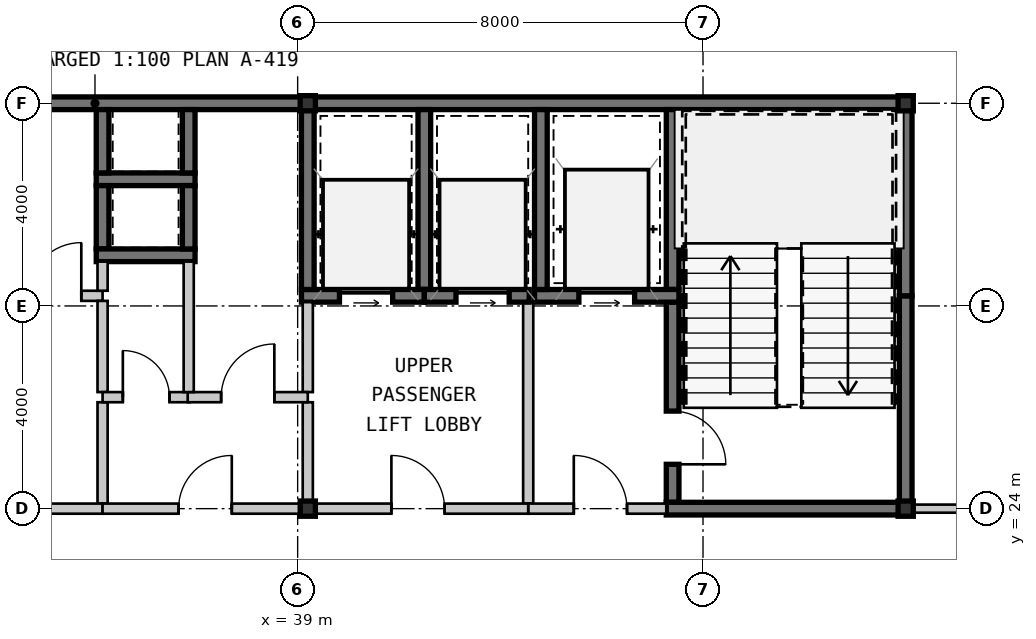
"""IFC4 building model, lengths in metres.
Left out: names, types, materials, properties, quantities, classifications, styles, units other than length and angle.
Written with IfcOpenShell. Run it as: python <this file> out.ifc"""

import sys

from ifc_helpers import new_model, si_unit, direction, frame, frame_2d, origin, origin_2d, place, context, subcontext, project, spatial, rectangle, hollow_rectangle, extrude, source, transform, mapped, element, fill, save


model = new_model("IFC4")
c1 = context("Model", 3, precision=1e-05, world=origin(), true_north=direction((0.0, 1.0)))
c2 = subcontext(c1, "Body", "Model", "MODEL_VIEW")
j1 = project(units=[si_unit("LENGTHUNIT", "METRE"), si_unit("PLANEANGLEUNIT", "RADIAN")], contexts=[c1])
p1 = place(None, origin())
s1 = spatial("IfcSite", under=j1, at=p1, CompositionType="ELEMENT")
p2 = place(p1, origin())
s2 = spatial("IfcBuilding", under=s1, at=p2, CompositionType="ELEMENT")
p3 = place(p2, frame((0.0, 0.0, 246.05)))
s3 = spatial("IfcBuildingStorey", under=s2, at=p3, CompositionType="ELEMENT", Elevation=246.05)
m1 = source(origin(), c2, "Body", "SweptSolid", [
    extrude(hollow_rectangle(XDim=0.3, YDim=0.3, WallThickness=0.012, at=origin_2d()), origin(), (0.0, 0.0, 1.0), 3.15),
])
for number, where, z_axis, x_axis in (
    (1, (39.2, 24.0, 0.0), (0.0, 0.0, 1.0), (1.0, 0.0, 0.0)),
    (2, (51.0, 24.0, 0.0), (0.0, 0.0, 1.0), (1.0, 0.0, 0.0)),
    (3, (39.2, 32.0, 0.0), (0.0, 0.0, 1.0), (1.0, 0.0, 0.0)),
    (4, (51.0, 32.0, 0.0), (0.0, 0.0, 1.0), (1.0, 0.0, 0.0)),
):
    element("IfcColumn", number, at=place(p3, frame(where, z_axis=z_axis, x_axis=x_axis)), inside=s3, PredefinedType="COLUMN", context=c2, shape_type="MappedRepresentation", body=[
        mapped(m1, transform((0.0, 0.0, 0.0), scale=1.0)),
    ])
m2 = source(origin(), c2, "Body", "SweptSolid", [
    extrude(rectangle(XDim=11.2, YDim=0.25, at=frame_2d((5.6, 0.0))), origin(), (0.0, 0.0, 1.0), 2.93),
])
p4 = place(p3, frame((28.0, 32.0, 0.0), z_axis=(0.0, 0.0, 1.0), x_axis=(1.0, 0.0, 0.0)))
e5 = element("IfcWall", 5, at=p4, inside=s3, PredefinedType="SHEAR", context=c2, shape_type="MappedRepresentation", body=[
    mapped(m2, transform((0.0, 0.0, 0.0), scale=1.0)),
])
m3 = source(origin(), c2, "Body", "SweptSolid", [
    extrude(rectangle(XDim=11.925, YDim=0.25, at=frame_2d((5.962, 0.0))), origin(), (0.0, 0.0, 1.0), 2.93),
])
p5 = place(p3, frame((39.2, 32.0, 0.0), z_axis=(0.0, 0.0, 1.0), x_axis=(1.0, 0.0, 0.0)))
e6 = element("IfcWall", 6, at=p5, inside=s3, PredefinedType="SHEAR", context=c2, shape_type="MappedRepresentation", body=[
    mapped(m3, transform((0.0, 0.0, 0.0), scale=1.0)),
])
m4 = source(origin(), c2, "Body", "SweptSolid", [
    extrude(rectangle(XDim=4.075, YDim=0.25, at=frame_2d((2.038, 0.0))), origin(), (0.0, 0.0, 1.0), 2.93),
])
p6 = place(p3, frame((51.0, 24.125, 0.0), z_axis=(0.0, 0.0, 1.0), x_axis=(0.0, 1.0, 0.0)))
e7 = element("IfcWall", 7, at=p6, inside=s3, PredefinedType="SHEAR", context=c2, shape_type="MappedRepresentation", body=[
    mapped(m4, transform((0.0, 0.0, 0.0), scale=1.0)),
])
m5 = source(origin(), c2, "Body", "SweptSolid", [
    extrude(rectangle(XDim=3.675, YDim=0.25, at=frame_2d((1.837, 0.0))), origin(), (0.0, 0.0, 1.0), 2.93),
])
p7 = place(p3, frame((51.0, 28.2, 0.0), z_axis=(0.0, 0.0, 1.0), x_axis=(0.0, 1.0, 0.0)))
e8 = element("IfcWall", 8, at=p7, inside=s3, PredefinedType="SHEAR", context=c2, shape_type="MappedRepresentation", body=[
    mapped(m5, transform((0.0, 0.0, 0.0), scale=1.0)),
])
m6 = source(origin(), c2, "Body", "SweptSolid", [
    extrude(rectangle(XDim=3.55, YDim=0.25, at=frame_2d((1.775, 0.0))), origin(), (0.0, 0.0, 1.0), 2.93),
])
p8 = place(p3, frame((46.4, 31.875, 0.0), z_axis=(0.0, 0.0, 1.0), x_axis=(0.0, -1.0, 0.0)))
e9 = element("IfcWall", 9, at=p8, inside=s3, PredefinedType="SHEAR", context=c2, shape_type="MappedRepresentation", body=[
    mapped(m6, transform((0.0, 0.0, 0.0), scale=1.0)),
])
m7 = source(origin(), c2, "Body", "SweptSolid", [
    extrude(rectangle(XDim=3.95, YDim=0.25, at=frame_2d((1.975, 0.0))), origin(), (0.0, 0.0, 1.0), 2.93),
])
p9 = place(p3, frame((46.4, 28.075, 0.0), z_axis=(0.0, 0.0, 1.0), x_axis=(0.0, -1.0, 0.0)))
e10 = element("IfcWall", 10, at=p9, inside=s3, PredefinedType="SHEAR", context=c2, shape_type="MappedRepresentation", body=[
    mapped(m7, transform((0.0, 0.0, 0.0), scale=1.0)),
])
m8 = source(origin(), c2, "Body", "SweptSolid", [
    extrude(rectangle(XDim=1.05, YDim=2.1, at=frame_2d((0.525, 1.05))), frame((0.0, 0.135, 0.0), z_axis=(0.0, -1.0, 0.0), x_axis=(1.0, 0.0, 0.0)), (0.0, 0.0, 1.0), 0.27),
])
p10 = place(p9, frame((2.15, 0.0, 0.0)))
e11 = element("IfcOpeningElement", 11, at=p10, cuts=e10, PredefinedType="OPENING", context=c2, shape_type="MappedRepresentation", body=[
    mapped(m8, transform((0.0, 0.0, 0.0), scale=1.0)),
])
m9 = source(origin(), c2, "Body", "SweptSolid", [
    extrude(rectangle(XDim=4.85, YDim=0.25, at=frame_2d((2.425, 0.0))), origin(), (0.0, 0.0, 1.0), 2.93),
])
p11 = place(p3, frame((46.275, 24.0, 0.0), z_axis=(0.0, 0.0, 1.0), x_axis=(1.0, 0.0, 0.0)))
e12 = element("IfcWall", 12, at=p11, inside=s3, PredefinedType="SHEAR", context=c2, shape_type="MappedRepresentation", body=[
    mapped(m9, transform((0.0, 0.0, 0.0), scale=1.0)),
])
m10 = source(origin(), c2, "Body", "SweptSolid", [
    extrude(rectangle(XDim=2.85, YDim=0.25, at=frame_2d((1.425, 0.0))), origin(), (0.0, 0.0, 1.0), 2.93),
])
p12 = place(p3, frame((43.675, 28.2, 0.0), z_axis=(0.0, 0.0, 1.0), x_axis=(1.0, 0.0, 0.0)))
e13 = element("IfcWall", 13, at=p12, inside=s3, PredefinedType="SHEAR", context=c2, shape_type="MappedRepresentation", body=[
    mapped(m10, transform((0.0, 0.0, 0.0), scale=1.0)),
])
m11 = source(origin(), c2, "Body", "SweptSolid", [
    extrude(rectangle(XDim=1.1, YDim=2.15, at=frame_2d((0.55, 1.075))), frame((0.0, 0.135, 0.0), z_axis=(0.0, -1.0, 0.0), x_axis=(1.0, 0.0, 0.0)), (0.0, 0.0, 1.0), 0.27),
])
p13 = place(p12, frame((0.875, 0.0, 0.0)))
e14 = element("IfcOpeningElement", 14, at=p13, cuts=e13, PredefinedType="OPENING", context=c2, shape_type="MappedRepresentation", body=[
    mapped(m11, transform((0.0, 0.0, 0.0), scale=1.0)),
])
p14 = place(p3, frame((43.8, 31.875, 0.0), z_axis=(0.0, 0.0, 1.0), x_axis=(0.0, -1.0, 0.0)))
e15 = element("IfcWall", 15, at=p14, inside=s3, PredefinedType="SHEAR", context=c2, shape_type="MappedRepresentation", body=[
    mapped(m6, transform((0.0, 0.0, 0.0), scale=1.0)),
])
m12 = source(origin(), c2, "Body", "SweptSolid", [
    extrude(rectangle(XDim=3.975, YDim=0.2, at=frame_2d((1.987, 0.0))), origin(), (0.0, 0.0, 1.0), 2.93),
])
p15 = place(p3, frame((43.55, 28.075, 0.0), z_axis=(0.0, 0.0, 1.0), x_axis=(0.0, -1.0, 0.0)))
e16 = element("IfcWall", 16, at=p15, inside=s3, PredefinedType="SOLIDWALL", context=c2, shape_type="MappedRepresentation", body=[
    mapped(m12, transform((0.0, 0.0, 0.0), scale=1.0)),
])
m13 = source(origin(), c2, "Body", "SweptSolid", [
    extrude(rectangle(XDim=2.725, YDim=0.2, at=frame_2d((1.362, 0.0))), origin(), (0.0, 0.0, 1.0), 2.397),
])
p16 = place(p3, frame((43.55, 24.0, 0.0), z_axis=(0.0, 0.0, 1.0), x_axis=(1.0, 0.0, 0.0)))
e17 = element("IfcWall", 17, at=p16, inside=s3, PredefinedType="SOLIDWALL", context=c2, shape_type="MappedRepresentation", body=[
    mapped(m13, transform((0.0, 0.0, 0.0), scale=1.0)),
])
m14 = source(origin(), c2, "Body", "SweptSolid", [
    extrude(rectangle(XDim=1.05, YDim=2.1, at=frame_2d((0.525, 1.05))), frame((0.0, 0.11, 0.0), z_axis=(0.0, -1.0, 0.0), x_axis=(1.0, 0.0, 0.0)), (0.0, 0.0, 1.0), 0.22),
])
p17 = place(p16, frame((0.9, 0.0, 0.0)))
e18 = element("IfcOpeningElement", 18, at=p17, cuts=e17, PredefinedType="OPENING", context=c2, shape_type="MappedRepresentation", body=[
    mapped(m14, transform((0.0, 0.0, 0.0), scale=1.0)),
])
m15 = source(origin(), c2, "Body", "SweptSolid", [
    extrude(rectangle(XDim=1.95, YDim=0.25, at=frame_2d((0.975, 0.0))), origin(), (0.0, 0.0, 1.0), 2.93),
])
p18 = place(p3, frame((35.025, 30.5, 0.0), z_axis=(0.0, 0.0, 1.0), x_axis=(1.0, 0.0, 0.0)))
e19 = element("IfcWall", 19, at=p18, inside=s3, PredefinedType="SHEAR", context=c2, shape_type="MappedRepresentation", body=[
    mapped(m15, transform((0.0, 0.0, 0.0), scale=1.0)),
])
m16 = source(origin(), c2, "Body", "SweptSolid", [
    extrude(rectangle(XDim=1.25, YDim=0.25, at=frame_2d((0.625, 0.0))), origin(), (0.0, 0.0, 1.0), 2.93),
])
for number, where, z_axis, x_axis in (
    (20, (35.15, 31.875, 0.0), (0.0, 0.0, 1.0), (0.0, -1.0, 0.0)),
    (21, (36.85, 30.625, 0.0), (0.0, 0.0, 1.0), (0.0, 1.0, 0.0)),
    (22, (35.15, 30.375, 0.0), (0.0, 0.0, 1.0), (0.0, -1.0, 0.0)),
):
    element("IfcWall", number, at=place(p3, frame(where, z_axis=z_axis, x_axis=x_axis)), inside=s3, PredefinedType="SHEAR", context=c2, shape_type="MappedRepresentation", body=[
        mapped(m16, transform((0.0, 0.0, 0.0), scale=1.0)),
    ])
p19 = place(p3, frame((35.025, 29.0, 0.0), z_axis=(0.0, 0.0, 1.0), x_axis=(1.0, 0.0, 0.0)))
e23 = element("IfcWall", 23, at=p19, inside=s3, PredefinedType="SHEAR", context=c2, shape_type="MappedRepresentation", body=[
    mapped(m15, transform((0.0, 0.0, 0.0), scale=1.0)),
])
p20 = place(p3, frame((36.85, 29.125, 0.0), z_axis=(0.0, 0.0, 1.0), x_axis=(0.0, 1.0, 0.0)))
e24 = element("IfcWall", 24, at=p20, inside=s3, PredefinedType="SHEAR", context=c2, shape_type="MappedRepresentation", body=[
    mapped(m16, transform((0.0, 0.0, 0.0), scale=1.0)),
])
p21 = place(p3, frame((41.5, 28.325, 0.0), z_axis=(0.0, 0.0, 1.0), x_axis=(0.0, 1.0, 0.0)))
e25 = element("IfcWall", 25, at=p21, inside=s3, PredefinedType="SHEAR", context=c2, shape_type="MappedRepresentation", body=[
    mapped(m6, transform((0.0, 0.0, 0.0), scale=1.0)),
])
m17 = source(origin(), c2, "Body", "SweptSolid", [
    extrude(rectangle(XDim=2.425, YDim=0.25, at=frame_2d((1.212, 0.0))), origin(), (0.0, 0.0, 1.0), 2.93),
])
p22 = place(p3, frame((39.075, 28.2, 0.0), z_axis=(0.0, 0.0, 1.0), x_axis=(1.0, 0.0, 0.0)))
e26 = element("IfcWall", 26, at=p22, inside=s3, PredefinedType="SHEAR", context=c2, shape_type="MappedRepresentation", body=[
    mapped(m17, transform((0.0, 0.0, 0.0), scale=1.0)),
])
m18 = source(origin(), c2, "Body", "SweptSolid", [
    extrude(rectangle(XDim=1.05, YDim=2.15, at=frame_2d((0.525, 1.075))), frame((0.0, 0.135, 0.0), z_axis=(0.0, -1.0, 0.0), x_axis=(1.0, 0.0, 0.0)), (0.0, 0.0, 1.0), 0.27),
])
p23 = place(p22, frame((0.75, 0.0, 0.0)))
e27 = element("IfcOpeningElement", 27, at=p23, cuts=e26, PredefinedType="OPENING", context=c2, shape_type="MappedRepresentation", body=[
    mapped(m18, transform((0.0, 0.0, 0.0), scale=1.0)),
])
p24 = place(p3, frame((39.2, 31.875, 0.0), z_axis=(0.0, 0.0, 1.0), x_axis=(0.0, -1.0, 0.0)))
e28 = element("IfcWall", 28, at=p24, inside=s3, PredefinedType="SHEAR", context=c2, shape_type="MappedRepresentation", body=[
    mapped(m6, transform((0.0, 0.0, 0.0), scale=1.0)),
])
m19 = source(origin(), c2, "Body", "SweptSolid", [
    extrude(rectangle(XDim=2.07, YDim=0.25, at=frame_2d((1.035, 0.0))), origin(), (0.0, 0.0, 1.0), 2.93),
])
p25 = place(p3, frame((41.5, 28.2, 0.0), z_axis=(0.0, 0.0, 1.0), x_axis=(1.0, 0.0, 0.0)))
e29 = element("IfcWall", 29, at=p25, inside=s3, PredefinedType="SHEAR", context=c2, shape_type="MappedRepresentation", body=[
    mapped(m19, transform((0.0, 0.0, 0.0), scale=1.0)),
])
p26 = place(p25, frame((0.625, 0.0, 0.0)))
e30 = element("IfcOpeningElement", 30, at=p26, cuts=e29, PredefinedType="OPENING", context=c2, shape_type="MappedRepresentation", body=[
    mapped(m18, transform((0.0, 0.0, 0.0), scale=1.0)),
])
m20 = source(origin(), c2, "Body", "SweptSolid", [
    extrude(rectangle(XDim=2.0, YDim=0.2, at=frame_2d((1.0, 0.0))), origin(), (0.0, 0.0, 1.0), 2.47),
])
p27 = place(p3, frame((39.2, 24.1, 0.0), z_axis=(0.0, 0.0, 1.0), x_axis=(0.0, 1.0, 0.0)))
e31 = element("IfcWall", 31, at=p27, inside=s3, PredefinedType="SOLIDWALL", context=c2, shape_type="MappedRepresentation", body=[
    mapped(m20, transform((0.0, 0.0, 0.0), scale=1.0)),
])
m21 = source(origin(), c2, "Body", "SweptSolid", [
    extrude(rectangle(XDim=1.775, YDim=0.2, at=frame_2d((0.887, 0.0))), origin(), (0.0, 0.0, 1.0), 2.47),
])
p28 = place(p3, frame((39.2, 26.3, 0.0), z_axis=(0.0, 0.0, 1.0), x_axis=(0.0, 1.0, 0.0)))
e32 = element("IfcWall", 32, at=p28, inside=s3, PredefinedType="SOLIDWALL", context=c2, shape_type="MappedRepresentation", body=[
    mapped(m21, transform((0.0, 0.0, 0.0), scale=1.0)),
])
m22 = source(origin(), c2, "Body", "SweptSolid", [
    extrude(rectangle(XDim=4.35, YDim=0.2, at=frame_2d((2.175, 0.0))), origin(), (0.0, 0.0, 1.0), 2.397),
])
p29 = place(p3, frame((43.55, 24.0, 0.0), z_axis=(0.0, 0.0, 1.0), x_axis=(-1.0, 0.0, 0.0)))
e33 = element("IfcWall", 33, at=p29, inside=s3, PredefinedType="SOLIDWALL", context=c2, shape_type="MappedRepresentation", body=[
    mapped(m22, transform((0.0, 0.0, 0.0), scale=1.0)),
])
p30 = place(p29, frame((1.65, 0.0, 0.0)))
e34 = element("IfcOpeningElement", 34, at=p30, cuts=e33, PredefinedType="OPENING", context=c2, shape_type="MappedRepresentation", body=[
    mapped(m14, transform((0.0, 0.0, 0.0), scale=1.0)),
])
m23 = source(origin(), c2, "Body", "SweptSolid", [
    extrude(rectangle(XDim=4.35, YDim=0.2, at=frame_2d((2.175, 0.0))), origin(), (0.0, 0.0, 1.0), 2.93),
])
p31 = place(p3, frame((30.8, 28.2, 0.0), z_axis=(0.0, 0.0, 1.0), x_axis=(1.0, 0.0, 0.0)))
e35 = element("IfcWall", 35, at=p31, inside=s3, PredefinedType="SOLIDWALL", context=c2, shape_type="MappedRepresentation", body=[
    mapped(m23, transform((0.0, 0.0, 0.0), scale=1.0)),
])
p32 = place(p31, frame((2.88, 0.0, 0.0)))
e36 = element("IfcOpeningElement", 36, at=p32, cuts=e35, PredefinedType="OPENING", context=c2, shape_type="MappedRepresentation", body=[
    mapped(m14, transform((0.0, 0.0, 0.0), scale=1.0)),
])
m24 = source(origin(), c2, "Body", "SweptSolid", [
    extrude(rectangle(XDim=2.0, YDim=0.2, at=frame_2d((1.0, 0.0))), origin(), (0.0, 0.0, 1.0), 2.93),
])
p33 = place(p3, frame((35.15, 26.1, 0.0), z_axis=(0.0, 0.0, 1.0), x_axis=(0.0, -1.0, 0.0)))
e37 = element("IfcWall", 37, at=p33, inside=s3, PredefinedType="SOLIDWALL", context=c2, shape_type="MappedRepresentation", body=[
    mapped(m24, transform((0.0, 0.0, 0.0), scale=1.0)),
])
m25 = source(origin(), c2, "Body", "SweptSolid", [
    extrude(rectangle(XDim=1.8, YDim=0.2, at=frame_2d((0.9, 0.0))), origin(), (0.0, 0.0, 1.0), 2.93),
])
p34 = place(p3, frame((35.15, 28.1, 0.0), z_axis=(0.0, 0.0, 1.0), x_axis=(0.0, -1.0, 0.0)))
e38 = element("IfcWall", 38, at=p34, inside=s3, PredefinedType="SOLIDWALL", context=c2, shape_type="MappedRepresentation", body=[
    mapped(m25, transform((0.0, 0.0, 0.0), scale=1.0)),
])
m26 = source(origin(), c2, "Body", "SweptSolid", [
    extrude(rectangle(XDim=4.35, YDim=0.2, at=frame_2d((2.175, 0.0))), origin(), (0.0, 0.0, 1.0), 2.47),
])
p35 = place(p3, frame((35.15, 24.0, 0.0), z_axis=(0.0, 0.0, 1.0), x_axis=(-1.0, 0.0, 0.0)))
e39 = element("IfcWall", 39, at=p35, inside=s3, PredefinedType="SOLIDWALL", context=c2, shape_type="MappedRepresentation", body=[
    mapped(m26, transform((0.0, 0.0, 0.0), scale=1.0)),
])
p36 = place(p35, frame((1.65, 0.0, 0.0)))
e40 = element("IfcOpeningElement", 40, at=p36, cuts=e39, PredefinedType="OPENING", context=c2, shape_type="MappedRepresentation", body=[
    mapped(m14, transform((0.0, 0.0, 0.0), scale=1.0)),
])
m27 = source(origin(), c2, "Body", "SweptSolid", [
    extrude(rectangle(XDim=0.575, YDim=0.2, at=frame_2d((0.288, 0.0))), origin(), (0.0, 0.0, 1.0), 2.93),
])
p37 = place(p3, frame((35.15, 28.875, 0.0), z_axis=(0.0, 0.0, 1.0), x_axis=(0.0, -1.0, 0.0)))
e41 = element("IfcWall", 41, at=p37, inside=s3, PredefinedType="SOLIDWALL", context=c2, shape_type="MappedRepresentation", body=[
    mapped(m27, transform((0.0, 0.0, 0.0), scale=1.0)),
])
m28 = source(origin(), c2, "Body", "SweptSolid", [
    extrude(rectangle(XDim=1.72, YDim=0.2, at=frame_2d((0.86, 0.0))), origin(), (0.0, 0.0, 1.0), 2.93),
])
p38 = place(p3, frame((35.15, 26.2, 0.0), z_axis=(0.0, 0.0, 1.0), x_axis=(1.0, 0.0, 0.0)))
e42 = element("IfcWall", 42, at=p38, inside=s3, PredefinedType="SOLIDWALL", context=c2, shape_type="MappedRepresentation", body=[
    mapped(m28, transform((0.0, 0.0, 0.0), scale=1.0)),
])
m29 = source(origin(), c2, "Body", "SweptSolid", [
    extrude(rectangle(XDim=0.92, YDim=2.1, at=frame_2d((0.46, 1.05))), frame((0.0, 0.11, 0.0), z_axis=(0.0, -1.0, 0.0), x_axis=(1.0, 0.0, 0.0)), (0.0, 0.0, 1.0), 0.22),
])
p39 = place(p38, frame((0.4, 0.0, 0.0)))
e43 = element("IfcOpeningElement", 43, at=p39, cuts=e42, PredefinedType="OPENING", context=c2, shape_type="MappedRepresentation", body=[
    mapped(m29, transform((0.0, 0.0, 0.0), scale=1.0)),
])
m30 = source(origin(), c2, "Body", "SweptSolid", [
    extrude(rectangle(XDim=2.37, YDim=0.2, at=frame_2d((1.185, 0.0))), origin(), (0.0, 0.0, 1.0), 2.93),
])
p40 = place(p3, frame((36.83, 26.2, 0.0), z_axis=(0.0, 0.0, 1.0), x_axis=(1.0, 0.0, 0.0)))
e44 = element("IfcWall", 44, at=p40, inside=s3, PredefinedType="SOLIDWALL", context=c2, shape_type="MappedRepresentation", body=[
    mapped(m30, transform((0.0, 0.0, 0.0), scale=1.0)),
])
p41 = place(p40, frame((0.66, 0.0, 0.0)))
e45 = element("IfcOpeningElement", 45, at=p41, cuts=e44, PredefinedType="OPENING", context=c2, shape_type="MappedRepresentation", body=[
    mapped(m14, transform((0.0, 0.0, 0.0), scale=1.0)),
])
m31 = source(origin(), c2, "Body", "SweptSolid", [
    extrude(rectangle(XDim=4.05, YDim=0.2, at=frame_2d((2.025, 0.0))), origin(), (0.0, 0.0, 1.0), 2.47),
])
p42 = place(p3, frame((39.2, 24.0, 0.0), z_axis=(0.0, 0.0, 1.0), x_axis=(-1.0, 0.0, 0.0)))
e46 = element("IfcWall", 46, at=p42, inside=s3, PredefinedType="SOLIDWALL", context=c2, shape_type="MappedRepresentation", body=[
    mapped(m31, transform((0.0, 0.0, 0.0), scale=1.0)),
])
p43 = place(p42, frame((1.5, 0.0, 0.0)))
e47 = element("IfcOpeningElement", 47, at=p43, cuts=e46, PredefinedType="OPENING", context=c2, shape_type="MappedRepresentation", body=[
    mapped(m14, transform((0.0, 0.0, 0.0), scale=1.0)),
])
m32 = source(origin(), c2, "Body", "SweptSolid", [
    extrude(rectangle(XDim=2.575, YDim=0.2, at=frame_2d((1.288, 0.0))), origin(), (0.0, 0.0, 1.0), 2.93),
])
p44 = place(p3, frame((36.85, 28.875, 0.0), z_axis=(0.0, 0.0, 1.0), x_axis=(0.0, -1.0, 0.0)))
e48 = element("IfcWall", 48, at=p44, inside=s3, PredefinedType="SOLIDWALL", context=c2, shape_type="MappedRepresentation", body=[
    mapped(m32, transform((0.0, 0.0, 0.0), scale=1.0)),
])
m33 = source(origin(), c2, "Body", "SweptSolid", [
    extrude(rectangle(XDim=6.378, YDim=0.16, at=frame_2d((3.189, 0.0))), origin(), (0.0, 0.0, 1.0), 2.93),
])
p45 = place(p3, frame((51.125, 24.0, 0.0), z_axis=(0.0, 0.0, 1.0), x_axis=(1.0, 0.0, 0.0)))
e49 = element("IfcWall", 49, at=p45, inside=s3, PredefinedType="PARTITIONING", context=c2, shape_type="MappedRepresentation", body=[
    mapped(m33, transform((0.0, 0.0, 0.0), scale=1.0)),
])
m34 = source(origin(), c2, "Body", "SweptSolid", [
    extrude(rectangle(XDim=0.92, YDim=2.1, at=frame_2d((0.46, 1.05))), frame((0.0, 0.09, 0.0), z_axis=(0.0, -1.0, 0.0), x_axis=(1.0, 0.0, 0.0)), (0.0, 0.0, 1.0), 0.18),
])
p46 = place(p45, frame((2.677, 0.0, 0.0)))
e50 = element("IfcOpeningElement", 50, at=p46, cuts=e49, PredefinedType="OPENING", context=c2, shape_type="MappedRepresentation", body=[
    mapped(m34, transform((0.0, 0.0, 0.0), scale=1.0)),
])
m35 = source(origin(), c2, "Body", "SweptSolid", [
    extrude(rectangle(XDim=1.05, YDim=2.1, at=frame_2d((0.525, 1.05))), frame((0.0, 0.025, 0.0), z_axis=(0.0, -1.0, 0.0), x_axis=(1.0, 0.0, 0.0)), (0.0, 0.0, 1.0), 0.05),
])
p47 = place(p10, origin())
e51 = element("IfcDoor", 51, at=p47, inside=s3, OperationType="SINGLE_SWING_RIGHT", PredefinedType="DOOR", context=c2, shape_type="MappedRepresentation", body=[
    mapped(m35, transform((0.0, 0.0, 0.0), scale=1.0)),
])
fill(e11, e51)
m36 = source(origin(), c2, "Body", "SweptSolid", [
    extrude(rectangle(XDim=1.1, YDim=2.15, at=frame_2d((0.55, 1.075))), frame((0.0, 0.025, 0.0), z_axis=(0.0, -1.0, 0.0), x_axis=(1.0, 0.0, 0.0)), (0.0, 0.0, 1.0), 0.05),
])
p48 = place(p13, origin())
e52 = element("IfcDoor", 52, at=p48, inside=s3, OperationType="SLIDING_TO_LEFT", PredefinedType="DOOR", context=c2, shape_type="MappedRepresentation", body=[
    mapped(m36, transform((0.0, 0.0, 0.0), scale=1.0)),
])
fill(e14, e52)
p49 = place(p17, origin())
e53 = element("IfcDoor", 53, at=p49, inside=s3, OperationType="SINGLE_SWING_LEFT", PredefinedType="DOOR", context=c2, shape_type="MappedRepresentation", body=[
    mapped(m35, transform((0.0, 0.0, 0.0), scale=1.0)),
])
fill(e18, e53)
m37 = source(origin(), c2, "Body", "SweptSolid", [
    extrude(rectangle(XDim=1.05, YDim=2.15, at=frame_2d((0.525, 1.075))), frame((0.0, 0.025, 0.0), z_axis=(0.0, -1.0, 0.0), x_axis=(1.0, 0.0, 0.0)), (0.0, 0.0, 1.0), 0.05),
])
p50 = place(p23, origin())
e54 = element("IfcDoor", 54, at=p50, inside=s3, OperationType="SLIDING_TO_LEFT", PredefinedType="DOOR", context=c2, shape_type="MappedRepresentation", body=[
    mapped(m37, transform((0.0, 0.0, 0.0), scale=1.0)),
])
fill(e27, e54)
p51 = place(p26, origin())
e55 = element("IfcDoor", 55, at=p51, inside=s3, OperationType="SLIDING_TO_LEFT", PredefinedType="DOOR", context=c2, shape_type="MappedRepresentation", body=[
    mapped(m37, transform((0.0, 0.0, 0.0), scale=1.0)),
])
fill(e30, e55)
p52 = place(p30, frame((1.05, 0.0, 0.0), z_axis=(0.0, 0.0, 1.0), x_axis=(-1.0, 0.0, 0.0)))
e56 = element("IfcDoor", 56, at=p52, inside=s3, OperationType="SINGLE_SWING_LEFT", PredefinedType="DOOR", context=c2, shape_type="MappedRepresentation", body=[
    mapped(m35, transform((0.0, 0.0, 0.0), scale=1.0)),
])
fill(e34, e56)
p53 = place(p32, origin())
e57 = element("IfcDoor", 57, at=p53, inside=s3, OperationType="SINGLE_SWING_RIGHT", PredefinedType="DOOR", context=c2, shape_type="MappedRepresentation", body=[
    mapped(m35, transform((0.0, 0.0, 0.0), scale=1.0)),
])
fill(e36, e57)
m38 = source(origin(), c2, "Body", "SweptSolid", [
    extrude(rectangle(XDim=0.92, YDim=2.1, at=frame_2d((0.46, 1.05))), frame((0.0, 0.025, 0.0), z_axis=(0.0, -1.0, 0.0), x_axis=(1.0, 0.0, 0.0)), (0.0, 0.0, 1.0), 0.05),
])
p54 = place(p39, origin())
e58 = element("IfcDoor", 58, at=p54, inside=s3, OperationType="SINGLE_SWING_LEFT", PredefinedType="DOOR", context=c2, shape_type="MappedRepresentation", body=[
    mapped(m38, transform((0.0, 0.0, 0.0), scale=1.0)),
])
fill(e43, e58)
p55 = place(p41, origin())
e59 = element("IfcDoor", 59, at=p55, inside=s3, OperationType="SINGLE_SWING_RIGHT", PredefinedType="DOOR", context=c2, shape_type="MappedRepresentation", body=[
    mapped(m35, transform((0.0, 0.0, 0.0), scale=1.0)),
])
fill(e45, e59)
p56 = place(p43, frame((1.05, 0.0, 0.0), z_axis=(0.0, 0.0, 1.0), x_axis=(-1.0, 0.0, 0.0)))
e60 = element("IfcDoor", 60, at=p56, inside=s3, OperationType="SINGLE_SWING_RIGHT", PredefinedType="DOOR", context=c2, shape_type="MappedRepresentation", body=[
    mapped(m35, transform((0.0, 0.0, 0.0), scale=1.0)),
])
fill(e47, e60)
save(model, sys.argv[1])
